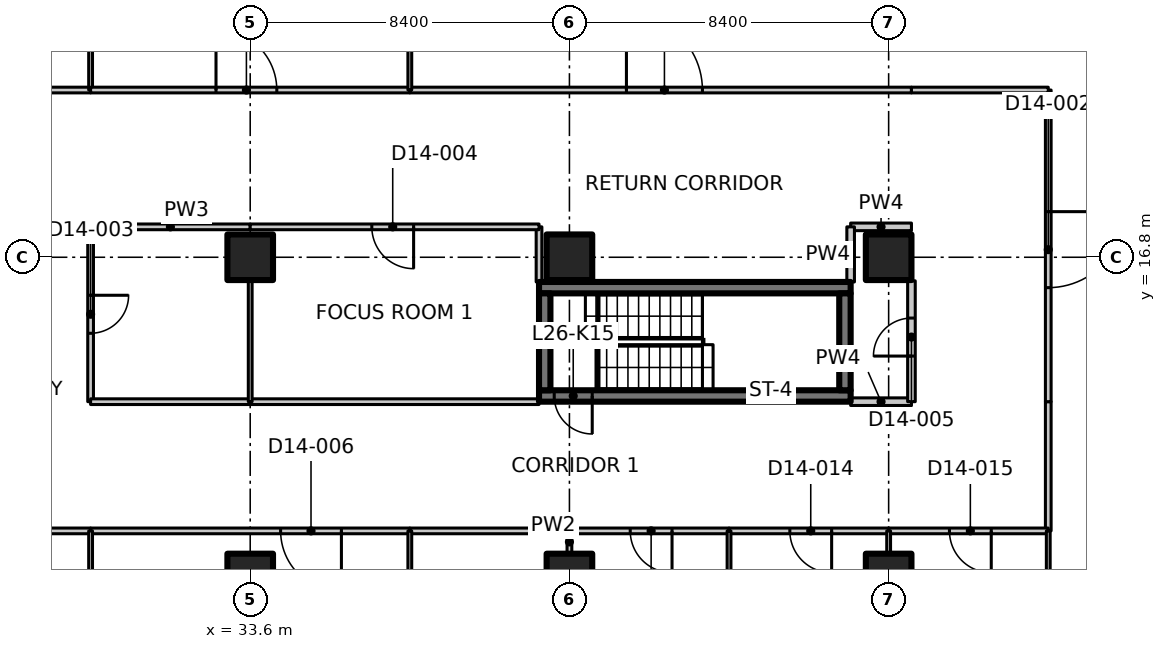
"""IFC4 building model, lengths in metres.
Left out: names, types, materials, properties, quantities, classifications, styles, units other than length and angle.
Written with IfcOpenShell. Run it as: python <this file> out.ifc"""

import sys

from ifc_helpers import new_model, si_unit, direction, frame, frame_2d, origin, origin_2d, place, context, subcontext, project, spatial, polyline, rectangle, outline, extrude, element, fill, save


model = new_model("IFC4")
c1 = context("Model", 3, precision=1e-05, world=origin(), true_north=direction((0.0, 1.0)))
c2 = subcontext(c1, "Body", "Model", "MODEL_VIEW")
j1 = project(units=[si_unit("LENGTHUNIT", "METRE"), si_unit("PLANEANGLEUNIT", "RADIAN")], contexts=[c1])
p1 = place(None, origin())
s1 = spatial("IfcSite", under=j1, at=p1, CompositionType="ELEMENT")
p2 = place(p1, origin())
s2 = spatial("IfcBuilding", under=s1, at=p2, CompositionType="ELEMENT")
p3 = place(p2, frame((0.0, 0.0, 109.7)))
s3 = spatial("IfcBuildingStorey", under=s2, at=p3, CompositionType="ELEMENT", Elevation=109.7)
for number, where, z_axis, x_axis in (
    (1, (33.6, 8.4, 0.0), (0.0, 0.0, 1.0), (1.0, 0.0, 0.0)),
    (2, (33.6, 16.8, 0.0), (0.0, 0.0, 1.0), (1.0, 0.0, 0.0)),
    (3, (42.0, 8.4, 0.0), (0.0, 0.0, 1.0), (1.0, 0.0, 0.0)),
    (4, (42.0, 16.8, 0.0), (0.0, 0.0, 1.0), (1.0, 0.0, 0.0)),
    (5, (50.4, 8.4, 0.0), (0.0, 0.0, 1.0), (1.0, 0.0, 0.0)),
    (6, (50.4, 16.8, 0.0), (0.0, 0.0, 1.0), (1.0, 0.0, 0.0)),
):
    element("IfcColumn", number, at=place(p3, frame(where, z_axis=z_axis, x_axis=x_axis)), inside=s3, PredefinedType="COLUMN", context=c2, shape_type="SweptSolid", body=[
        extrude(rectangle(XDim=1.2, YDim=1.2, at=origin_2d()), origin(), (0.0, 0.0, 1.0), 3.35),
    ])
p4 = place(p3, frame((49.4, 13.15, 0.0), z_axis=(0.0, 0.0, 1.0), x_axis=(-1.0, 0.0, 0.0)))
e7 = element("IfcWall", 7, at=p4, inside=s3, PredefinedType="SHEAR", context=c2, shape_type="SweptSolid", body=[
    extrude(rectangle(XDim=8.2, YDim=0.3, at=frame_2d((4.1, 0.0))), origin(), (0.0, 0.0, 1.0), 3.35),
])
p5 = place(p4, frame((6.8, 0.0, 0.0)))
e8 = element("IfcOpeningElement", 8, at=p5, cuts=e7, PredefinedType="OPENING", context=c2, shape_type="SweptSolid", body=[
    extrude(rectangle(XDim=1.0, YDim=2.1, at=frame_2d((0.5, 1.05))), frame((0.0, 0.16, 0.0), z_axis=(0.0, -1.0, 0.0), x_axis=(1.0, 0.0, 0.0)), (0.0, 0.0, 1.0), 0.32),
])
p6 = place(p3, frame((41.2, 16.0, 0.0), z_axis=(0.0, 0.0, 1.0), x_axis=(1.0, 0.0, 0.0)))
e9 = element("IfcWall", 9, at=p6, inside=s3, PredefinedType="SHEAR", context=c2, shape_type="SweptSolid", body=[
    extrude(rectangle(XDim=8.2, YDim=0.3, at=frame_2d((4.1, 0.0))), origin(), (0.0, 0.0, 1.0), 3.35),
])
for number, where, z_axis, x_axis in (
    (10, (41.35, 13.3, 0.0), (0.0, 0.0, 1.0), (0.0, 1.0, 0.0)),
    (11, (49.25, 13.3, 0.0), (0.0, 0.0, 1.0), (0.0, 1.0, 0.0)),
):
    element("IfcWall", number, at=place(p3, frame(where, z_axis=z_axis, x_axis=x_axis)), inside=s3, PredefinedType="SHEAR", context=c2, shape_type="SweptSolid", body=[
        extrude(rectangle(XDim=2.55, YDim=0.3, at=frame_2d((1.275, 0.0))), origin(), (0.0, 0.0, 1.0), 3.35),
    ])
p7 = place(p3, frame((25.2, 21.2, 0.0), z_axis=(0.0, 0.0, 1.0), x_axis=(1.0, 0.0, 0.0)))
e12 = element("IfcWall", 12, at=p7, inside=s3, PredefinedType="PARTITIONING", context=c2, shape_type="SweptSolid", body=[
    extrude(rectangle(XDim=4.2, YDim=0.15, at=frame_2d((2.1, 0.0))), origin(), (0.0, 0.0, 1.0), 3.33),
])
p8 = place(p3, frame((29.4, 17.6, 0.0), z_axis=(0.0, 0.0, 1.0), x_axis=(0.0, -1.0, 0.0)))
e13 = element("IfcWall", 13, at=p8, inside=s3, PredefinedType="PARTITIONING", context=c2, shape_type="SweptSolid", body=[
    extrude(rectangle(XDim=4.6, YDim=0.15, at=frame_2d((2.3, 0.0))), origin(), (0.0, 0.0, 1.0), 3.33),
])
p9 = place(p8, frame((1.8, 0.0, 0.0)))
e14 = element("IfcOpeningElement", 14, at=p9, cuts=e13, PredefinedType="OPENING", context=c2, shape_type="SweptSolid", body=[
    extrude(rectangle(XDim=1.0, YDim=2.1, at=frame_2d((0.5, 1.05))), frame((0.0, 0.085, 0.0), z_axis=(0.0, -1.0, 0.0), x_axis=(1.0, 0.0, 0.0)), (0.0, 0.0, 1.0), 0.17),
])
p10 = place(p3, frame((29.4, 9.6, 0.0), z_axis=(0.0, 0.0, 1.0), x_axis=(-1.0, 0.0, 0.0)))
e15 = element("IfcWall", 15, at=p10, inside=s3, PredefinedType="PARTITIONING", context=c2, shape_type="SweptSolid", body=[
    extrude(rectangle(XDim=4.2, YDim=0.15, at=frame_2d((2.1, 0.0))), origin(), (0.0, 0.0, 1.0), 3.33),
])
p11 = place(p3, frame((29.4, 27.429, 0.0), z_axis=(0.0, 0.0, 1.0), x_axis=(0.0, -1.0, 0.0)))
e16 = element("IfcWall", 16, at=p11, inside=s3, PredefinedType="PARTITIONING", context=c2, shape_type="SweptSolid", body=[
    extrude(outline(polyline([(0.0, 0.0), (6.229, 0.0), (6.229, 3.33), (2.679, 3.33), (2.677, 2.98), (1.781, 2.98), (1.779, 3.33), (0.154, 3.33), (0.0, 3.33), (0.0, 0.0)])), frame((0.0, 0.05, 0.0), z_axis=(0.0, -1.0, 0.0), x_axis=(1.0, 0.0, 0.0)), (0.0, 0.0, 1.0), 0.1),
])
p12 = place(p3, frame((54.6, 13.0, 0.0), z_axis=(0.0, 0.0, 1.0), x_axis=(0.0, -1.0, 0.0)))
e17 = element("IfcWall", 17, at=p12, inside=s3, PredefinedType="PARTITIONING", context=c2, shape_type="SweptSolid", body=[
    extrude(rectangle(XDim=3.4, YDim=0.15, at=frame_2d((1.7, 0.0))), origin(), (0.0, 0.0, 1.0), 3.33),
])
p13 = place(p3, frame((29.4, 13.0, 0.0), z_axis=(0.0, 0.0, 1.0), x_axis=(1.0, 0.0, 0.0)))
e18 = element("IfcWall", 18, at=p13, inside=s3, PredefinedType="PARTITIONING", context=c2, shape_type="SweptSolid", body=[
    extrude(rectangle(XDim=4.2, YDim=0.15, at=frame_2d((2.1, 0.0))), origin(), (0.0, 0.0, 1.0), 3.33),
])
p14 = place(p3, frame((33.6, 13.0, 0.0), z_axis=(0.0, 0.0, 1.0), x_axis=(1.0, 0.0, 0.0)))
e19 = element("IfcWall", 19, at=p14, inside=s3, PredefinedType="PARTITIONING", context=c2, shape_type="SweptSolid", body=[
    extrude(rectangle(XDim=7.6, YDim=0.15, at=frame_2d((3.8, 0.0))), origin(), (0.0, 0.0, 1.0), 3.33),
])
p15 = place(p3, frame((49.4, 13.0, 0.0), z_axis=(0.0, 0.0, 1.0), x_axis=(1.0, 0.0, 0.0)))
e20 = element("IfcWall", 20, at=p15, inside=s3, PredefinedType="PARTITIONING", context=c2, shape_type="SweptSolid", body=[
    extrude(rectangle(XDim=1.6, YDim=0.2, at=frame_2d((0.8, 0.0))), origin(), (0.0, 0.0, 1.0), 3.33),
])
p16 = place(p3, frame((37.8, 9.6, 0.0), z_axis=(0.0, 0.0, 1.0), x_axis=(-1.0, 0.0, 0.0)))
e21 = element("IfcWall", 21, at=p16, inside=s3, PredefinedType="PARTITIONING", context=c2, shape_type="SweptSolid", body=[
    extrude(rectangle(XDim=8.4, YDim=0.15, at=frame_2d((4.2, 0.0))), origin(), (0.0, 0.0, 1.0), 3.33),
])
p17 = place(p16, frame((1.8, 0.0, 0.0)))
e22 = element("IfcOpeningElement", 22, at=p17, cuts=e21, PredefinedType="OPENING", context=c2, shape_type="SweptSolid", body=[
    extrude(rectangle(XDim=1.6, YDim=2.1, at=frame_2d((0.8, 1.05))), frame((0.0, 0.085, 0.0), z_axis=(0.0, -1.0, 0.0), x_axis=(1.0, 0.0, 0.0)), (0.0, 0.0, 1.0), 0.17),
])
p18 = place(p3, frame((42.0, 9.6, 0.0), z_axis=(0.0, 0.0, 1.0), x_axis=(-1.0, 0.0, 0.0)))
e23 = element("IfcWall", 23, at=p18, inside=s3, PredefinedType="PARTITIONING", context=c2, shape_type="SweptSolid", body=[
    extrude(rectangle(XDim=4.2, YDim=0.15, at=frame_2d((2.1, 0.0))), origin(), (0.0, 0.0, 1.0), 3.33),
])
p19 = place(p3, frame((46.2, 9.6, 0.0), z_axis=(0.0, 0.0, 1.0), x_axis=(-1.0, 0.0, 0.0)))
e24 = element("IfcWall", 24, at=p19, inside=s3, PredefinedType="PARTITIONING", context=c2, shape_type="SweptSolid", body=[
    extrude(rectangle(XDim=4.2, YDim=0.15, at=frame_2d((2.1, 0.0))), origin(), (0.0, 0.0, 1.0), 3.33),
])
p20 = place(p19, frame((1.5, 0.0, 0.0)))
e25 = element("IfcOpeningElement", 25, at=p20, cuts=e24, PredefinedType="OPENING", context=c2, shape_type="SweptSolid", body=[
    extrude(rectangle(XDim=1.1, YDim=2.1, at=frame_2d((0.55, 1.05))), frame((0.0, 0.085, 0.0), z_axis=(0.0, -1.0, 0.0), x_axis=(1.0, 0.0, 0.0)), (0.0, 0.0, 1.0), 0.17),
])
p21 = place(p3, frame((50.4, 9.6, 0.0), z_axis=(0.0, 0.0, 1.0), x_axis=(-1.0, 0.0, 0.0)))
e26 = element("IfcWall", 26, at=p21, inside=s3, PredefinedType="PARTITIONING", context=c2, shape_type="SweptSolid", body=[
    extrude(rectangle(XDim=4.2, YDim=0.15, at=frame_2d((2.1, 0.0))), origin(), (0.0, 0.0, 1.0), 3.33),
])
p22 = place(p21, frame((1.5, 0.0, 0.0)))
e27 = element("IfcOpeningElement", 27, at=p22, cuts=e26, PredefinedType="OPENING", context=c2, shape_type="SweptSolid", body=[
    extrude(rectangle(XDim=1.1, YDim=2.1, at=frame_2d((0.55, 1.05))), frame((0.0, 0.085, 0.0), z_axis=(0.0, -1.0, 0.0), x_axis=(1.0, 0.0, 0.0)), (0.0, 0.0, 1.0), 0.17),
])
p23 = place(p3, frame((54.6, 9.6, 0.0), z_axis=(0.0, 0.0, 1.0), x_axis=(-1.0, 0.0, 0.0)))
e28 = element("IfcWall", 28, at=p23, inside=s3, PredefinedType="PARTITIONING", context=c2, shape_type="SweptSolid", body=[
    extrude(rectangle(XDim=4.2, YDim=0.15, at=frame_2d((2.1, 0.0))), origin(), (0.0, 0.0, 1.0), 3.33),
])
p24 = place(p23, frame((1.5, 0.0, 0.0)))
e29 = element("IfcOpeningElement", 29, at=p24, cuts=e28, PredefinedType="OPENING", context=c2, shape_type="SweptSolid", body=[
    extrude(rectangle(XDim=1.1, YDim=2.1, at=frame_2d((0.55, 1.05))), frame((0.0, 0.085, 0.0), z_axis=(0.0, -1.0, 0.0), x_axis=(1.0, 0.0, 0.0)), (0.0, 0.0, 1.0), 0.17),
])
p25 = place(p3, frame((54.6, 21.2, 0.0), z_axis=(0.0, 0.0, 1.0), x_axis=(0.0, -1.0, 0.0)))
e30 = element("IfcWall", 30, at=p25, inside=s3, PredefinedType="PARTITIONING", context=c2, shape_type="SweptSolid", body=[
    extrude(rectangle(XDim=8.2, YDim=0.15, at=frame_2d((4.1, 0.0))), origin(), (0.0, 0.0, 1.0), 3.33),
])
p26 = place(p25, frame((3.2, 0.0, 0.0)))
e31 = element("IfcOpeningElement", 31, at=p26, cuts=e30, PredefinedType="OPENING", context=c2, shape_type="SweptSolid", body=[
    extrude(rectangle(XDim=2.0, YDim=2.4, at=frame_2d((1.0, 1.2))), frame((0.0, 0.085, 0.0), z_axis=(0.0, -1.0, 0.0), x_axis=(1.0, 0.0, 0.0)), (0.0, 0.0, 1.0), 0.17),
])
p27 = place(p3, frame((54.6, -1.365, 0.0), z_axis=(0.0, 0.0, 1.0), x_axis=(0.0, 1.0, 0.0)))
e32 = element("IfcWall", 32, at=p27, inside=s3, PredefinedType="PARTITIONING", context=c2, shape_type="SweptSolid", body=[
    extrude(outline(polyline([(0.0, 0.0), (10.965, 0.0), (10.965, 3.33), (1.815, 3.33), (1.813, 2.98), (0.917, 2.98), (0.915, 3.33), (0.265, 3.33), (0.0, 3.33), (0.0, 0.0)])), frame((0.0, 0.05, 0.0), z_axis=(0.0, -1.0, 0.0), x_axis=(1.0, 0.0, 0.0)), (0.0, 0.0, 1.0), 0.1),
])
p28 = place(p3, frame((33.6, 17.6, 0.0), z_axis=(0.0, 0.0, 1.0), x_axis=(-1.0, 0.0, 0.0)))
e33 = element("IfcWall", 33, at=p28, inside=s3, PredefinedType="PARTITIONING", context=c2, shape_type="SweptSolid", body=[
    extrude(rectangle(XDim=4.2, YDim=0.15, at=frame_2d((2.1, 0.0))), origin(), (0.0, 0.0, 1.0), 3.33),
])
p29 = place(p3, frame((41.2, 16.15, 0.0), z_axis=(0.0, 0.0, 1.0), x_axis=(0.0, 1.0, 0.0)))
e34 = element("IfcWall", 34, at=p29, inside=s3, PredefinedType="PARTITIONING", context=c2, shape_type="SweptSolid", body=[
    extrude(rectangle(XDim=1.45, YDim=0.15, at=frame_2d((0.725, 0.0))), origin(), (0.0, 0.0, 1.0), 3.33),
])
p30 = place(p3, frame((41.2, 17.6, 0.0), z_axis=(0.0, 0.0, 1.0), x_axis=(-1.0, 0.0, 0.0)))
e35 = element("IfcWall", 35, at=p30, inside=s3, PredefinedType="PARTITIONING", context=c2, shape_type="SweptSolid", body=[
    extrude(rectangle(XDim=7.6, YDim=0.15, at=frame_2d((3.8, 0.0))), origin(), (0.0, 0.0, 1.0), 3.33),
])
p31 = place(p30, frame((3.3, 0.0, 0.0)))
e36 = element("IfcOpeningElement", 36, at=p31, cuts=e35, PredefinedType="OPENING", context=c2, shape_type="SweptSolid", body=[
    extrude(rectangle(XDim=1.1, YDim=2.1, at=frame_2d((0.55, 1.05))), frame((0.0, 0.085, 0.0), z_axis=(0.0, -1.0, 0.0), x_axis=(1.0, 0.0, 0.0)), (0.0, 0.0, 1.0), 0.17),
])
p32 = place(p3, frame((51.0, 17.6, 0.0), z_axis=(0.0, 0.0, 1.0), x_axis=(-1.0, 0.0, 0.0)))
e37 = element("IfcWall", 37, at=p32, inside=s3, PredefinedType="PARTITIONING", context=c2, shape_type="SweptSolid", body=[
    extrude(rectangle(XDim=1.6, YDim=0.2, at=frame_2d((0.8, 0.0))), origin(), (0.0, 0.0, 1.0), 3.33),
])
p33 = place(p3, frame((49.4, 17.6, 0.0), z_axis=(0.0, 0.0, 1.0), x_axis=(0.0, -1.0, 0.0)))
e38 = element("IfcWall", 38, at=p33, inside=s3, PredefinedType="PARTITIONING", context=c2, shape_type="SweptSolid", body=[
    extrude(rectangle(XDim=1.45, YDim=0.2, at=frame_2d((0.725, 0.0))), origin(), (0.0, 0.0, 1.0), 3.33),
])
p34 = place(p3, frame((29.4, 21.2, 0.0), z_axis=(0.0, 0.0, 1.0), x_axis=(1.0, 0.0, 0.0)))
e39 = element("IfcWall", 39, at=p34, inside=s3, PredefinedType="PARTITIONING", context=c2, shape_type="SweptSolid", body=[
    extrude(rectangle(XDim=8.4, YDim=0.15, at=frame_2d((4.2, 0.0))), origin(), (0.0, 0.0, 1.0), 3.33),
])
p35 = place(p34, frame((3.3, 0.0, 0.0)))
e40 = element("IfcOpeningElement", 40, at=p35, cuts=e39, PredefinedType="OPENING", context=c2, shape_type="SweptSolid", body=[
    extrude(rectangle(XDim=1.6, YDim=2.1, at=frame_2d((0.8, 1.05))), frame((0.0, 0.085, 0.0), z_axis=(0.0, -1.0, 0.0), x_axis=(1.0, 0.0, 0.0)), (0.0, 0.0, 1.0), 0.17),
])
p36 = place(p3, frame((37.8, 21.2, 0.0), z_axis=(0.0, 0.0, 1.0), x_axis=(1.0, 0.0, 0.0)))
e41 = element("IfcWall", 41, at=p36, inside=s3, PredefinedType="PARTITIONING", context=c2, shape_type="SweptSolid", body=[
    extrude(rectangle(XDim=13.2, YDim=0.15, at=frame_2d((6.6, 0.0))), origin(), (0.0, 0.0, 1.0), 3.33),
])
p37 = place(p36, frame((5.7, 0.0, 0.0)))
e42 = element("IfcOpeningElement", 42, at=p37, cuts=e41, PredefinedType="OPENING", context=c2, shape_type="SweptSolid", body=[
    extrude(rectangle(XDim=2.0, YDim=2.4, at=frame_2d((1.0, 1.2))), frame((0.0, 0.085, 0.0), z_axis=(0.0, -1.0, 0.0), x_axis=(1.0, 0.0, 0.0)), (0.0, 0.0, 1.0), 0.17),
])
p38 = place(p3, frame((51.0, 13.0, 0.0), z_axis=(0.0, 0.0, 1.0), x_axis=(0.0, 1.0, 0.0)))
e43 = element("IfcWall", 43, at=p38, inside=s3, PredefinedType="PARTITIONING", context=c2, shape_type="SweptSolid", body=[
    extrude(rectangle(XDim=3.18, YDim=0.2, at=frame_2d((1.59, 0.0))), origin(), (0.0, 0.0, 1.0), 3.33),
])
p39 = place(p38, frame((1.2, 0.0, 0.0)))
e44 = element("IfcOpeningElement", 44, at=p39, cuts=e43, PredefinedType="OPENING", context=c2, shape_type="SweptSolid", body=[
    extrude(rectangle(XDim=1.0, YDim=2.1, at=frame_2d((0.5, 1.05))), frame((0.0, 0.11, 0.0), z_axis=(0.0, -1.0, 0.0), x_axis=(1.0, 0.0, 0.0)), (0.0, 0.0, 1.0), 0.22),
])
p40 = place(p3, frame((51.0, 21.2, 0.0), z_axis=(0.0, 0.0, 1.0), x_axis=(1.0, 0.0, 0.0)))
e45 = element("IfcWall", 45, at=p40, inside=s3, PredefinedType="PARTITIONING", context=c2, shape_type="SweptSolid", body=[
    extrude(rectangle(XDim=3.6, YDim=0.15, at=frame_2d((1.8, 0.0))), origin(), (0.0, 0.0, 1.0), 3.33),
])
p41 = place(p3, frame((33.6, 16.18, 0.0), z_axis=(0.0, 0.0, 1.0), x_axis=(0.0, -1.0, 0.0)))
e46 = element("IfcWall", 46, at=p41, inside=s3, PredefinedType="PARTITIONING", context=c2, shape_type="SweptSolid", body=[
    extrude(rectangle(XDim=3.18, YDim=0.1, at=frame_2d((1.59, 0.0))), origin(), (0.0, 0.0, 1.0), 3.33),
])
p42 = place(p3, frame((37.8, 9.6, 0.0), z_axis=(0.0, 0.0, 1.0), x_axis=(0.0, -1.0, 0.0)))
e47 = element("IfcWall", 47, at=p42, inside=s3, PredefinedType="PARTITIONING", context=c2, shape_type="SweptSolid", body=[
    extrude(rectangle(XDim=4.2, YDim=0.1, at=frame_2d((2.1, 0.0))), origin(), (0.0, 0.0, 1.0), 3.33),
])
p43 = place(p3, frame((29.4, 6.0, 0.0), z_axis=(0.0, 0.0, 1.0), x_axis=(0.0, 1.0, 0.0)))
e48 = element("IfcWall", 48, at=p43, inside=s3, PredefinedType="PARTITIONING", context=c2, shape_type="SweptSolid", body=[
    extrude(rectangle(XDim=3.6, YDim=0.1, at=frame_2d((1.8, 0.0))), origin(), (0.0, 0.0, 1.0), 3.33),
])
p44 = place(p3, frame((42.0, 9.6, 0.0), z_axis=(0.0, 0.0, 1.0), x_axis=(0.0, -1.0, 0.0)))
e49 = element("IfcWall", 49, at=p44, inside=s3, PredefinedType="PARTITIONING", context=c2, shape_type="SweptSolid", body=[
    extrude(rectangle(XDim=0.58, YDim=0.125, at=frame_2d((0.29, 0.0))), origin(), (0.0, 0.0, 1.0), 3.33),
])
p45 = place(p3, frame((46.2, 9.6, 0.0), z_axis=(0.0, 0.0, 1.0), x_axis=(0.0, -1.0, 0.0)))
e50 = element("IfcWall", 50, at=p45, inside=s3, PredefinedType="PARTITIONING", context=c2, shape_type="SweptSolid", body=[
    extrude(outline(polyline([(0.0, 0.0), (10.965, 0.0), (10.965, 3.33), (10.7, 3.33), (10.05, 3.33), (10.048, 2.98), (9.152, 2.98), (9.15, 3.33), (0.0, 3.33), (0.0, 0.0)])), frame((0.0, 0.05, 0.0), z_axis=(0.0, -1.0, 0.0), x_axis=(1.0, 0.0, 0.0)), (0.0, 0.0, 1.0), 0.1),
])
p46 = place(p3, frame((50.4, 9.6, 0.0), z_axis=(0.0, 0.0, 1.0), x_axis=(0.0, -1.0, 0.0)))
e51 = element("IfcWall", 51, at=p46, inside=s3, PredefinedType="PARTITIONING", context=c2, shape_type="SweptSolid", body=[
    extrude(rectangle(XDim=0.58, YDim=0.1, at=frame_2d((0.29, 0.0))), origin(), (0.0, 0.0, 1.0), 3.33),
])
p47 = place(p3, frame((37.8, 30.243, 0.0), z_axis=(0.0, 0.0, 1.0), x_axis=(0.0, -1.0, 0.0)))
e52 = element("IfcWall", 52, at=p47, inside=s3, PredefinedType="PARTITIONING", context=c2, shape_type="SweptSolid", body=[
    extrude(outline(polyline([(0.0, 0.0), (9.043, 0.0), (9.043, 3.33), (5.493, 3.33), (5.491, 2.98), (4.595, 2.98), (4.593, 3.33), (0.0, 3.33), (0.0, 0.0)])), frame((0.0, 0.05, 0.0), z_axis=(0.0, -1.0, 0.0), x_axis=(1.0, 0.0, 0.0)), (0.0, 0.0, 1.0), 0.1),
])
p48 = place(p5, origin())
e53 = element("IfcDoor", 53, at=p48, inside=s3, OperationType="SINGLE_SWING_LEFT", PredefinedType="DOOR", context=c2, shape_type="SweptSolid", body=[
    extrude(rectangle(XDim=1.0, YDim=2.1, at=frame_2d((0.5, 1.05))), frame((0.0, 0.025, 0.0), z_axis=(0.0, -1.0, 0.0), x_axis=(1.0, 0.0, 0.0)), (0.0, 0.0, 1.0), 0.05),
])
fill(e8, e53)
p49 = place(p26, origin())
e54 = element("IfcDoor", 54, at=p49, inside=s3, OperationType="DOUBLE_DOOR_SINGLE_SWING", PredefinedType="DOOR", context=c2, shape_type="SweptSolid", body=[
    extrude(rectangle(XDim=2.0, YDim=2.4, at=frame_2d((1.0, 1.2))), frame((0.0, 0.025, 0.0), z_axis=(0.0, -1.0, 0.0), x_axis=(1.0, 0.0, 0.0)), (0.0, 0.0, 1.0), 0.05),
])
fill(e31, e54)
p50 = place(p9, origin())
e55 = element("IfcDoor", 55, at=p50, inside=s3, OperationType="SINGLE_SWING_LEFT", PredefinedType="DOOR", context=c2, shape_type="SweptSolid", body=[
    extrude(rectangle(XDim=1.0, YDim=2.1, at=frame_2d((0.5, 1.05))), frame((0.0, 0.025, 0.0), z_axis=(0.0, -1.0, 0.0), x_axis=(1.0, 0.0, 0.0)), (0.0, 0.0, 1.0), 0.05),
])
fill(e14, e55)
p51 = place(p31, origin())
e56 = element("IfcDoor", 56, at=p51, inside=s3, OperationType="SINGLE_SWING_LEFT", PredefinedType="DOOR", context=c2, shape_type="SweptSolid", body=[
    extrude(rectangle(XDim=1.1, YDim=2.1, at=frame_2d((0.55, 1.05))), frame((0.0, 0.025, 0.0), z_axis=(0.0, -1.0, 0.0), x_axis=(1.0, 0.0, 0.0)), (0.0, 0.0, 1.0), 0.05),
])
fill(e36, e56)
p52 = place(p39, origin())
e57 = element("IfcDoor", 57, at=p52, inside=s3, OperationType="SINGLE_SWING_LEFT", PredefinedType="DOOR", context=c2, shape_type="SweptSolid", body=[
    extrude(rectangle(XDim=1.0, YDim=2.1, at=frame_2d((0.5, 1.05))), frame((0.0, 0.025, 0.0), z_axis=(0.0, -1.0, 0.0), x_axis=(1.0, 0.0, 0.0)), (0.0, 0.0, 1.0), 0.05),
])
fill(e44, e57)
p53 = place(p17, origin())
e58 = element("IfcDoor", 58, at=p53, inside=s3, OperationType="DOUBLE_DOOR_SINGLE_SWING", PredefinedType="DOOR", context=c2, shape_type="SweptSolid", body=[
    extrude(rectangle(XDim=1.6, YDim=2.1, at=frame_2d((0.8, 1.05))), frame((0.0, 0.025, 0.0), z_axis=(0.0, -1.0, 0.0), x_axis=(1.0, 0.0, 0.0)), (0.0, 0.0, 1.0), 0.05),
])
fill(e22, e58)
p54 = place(p20, origin())
e59 = element("IfcDoor", 59, at=p54, inside=s3, OperationType="SINGLE_SWING_LEFT", PredefinedType="DOOR", context=c2, shape_type="SweptSolid", body=[
    extrude(rectangle(XDim=1.1, YDim=2.1, at=frame_2d((0.55, 1.05))), frame((0.0, 0.025, 0.0), z_axis=(0.0, -1.0, 0.0), x_axis=(1.0, 0.0, 0.0)), (0.0, 0.0, 1.0), 0.05),
])
fill(e25, e59)
p55 = place(p22, origin())
e60 = element("IfcDoor", 60, at=p55, inside=s3, OperationType="SINGLE_SWING_LEFT", PredefinedType="DOOR", context=c2, shape_type="SweptSolid", body=[
    extrude(rectangle(XDim=1.1, YDim=2.1, at=frame_2d((0.55, 1.05))), frame((0.0, 0.025, 0.0), z_axis=(0.0, -1.0, 0.0), x_axis=(1.0, 0.0, 0.0)), (0.0, 0.0, 1.0), 0.05),
])
fill(e27, e60)
p56 = place(p24, origin())
e61 = element("IfcDoor", 61, at=p56, inside=s3, OperationType="SINGLE_SWING_LEFT", PredefinedType="DOOR", context=c2, shape_type="SweptSolid", body=[
    extrude(rectangle(XDim=1.1, YDim=2.1, at=frame_2d((0.55, 1.05))), frame((0.0, 0.025, 0.0), z_axis=(0.0, -1.0, 0.0), x_axis=(1.0, 0.0, 0.0)), (0.0, 0.0, 1.0), 0.05),
])
fill(e29, e61)
p57 = place(p35, origin())
e62 = element("IfcDoor", 62, at=p57, inside=s3, OperationType="DOUBLE_DOOR_SINGLE_SWING", PredefinedType="DOOR", context=c2, shape_type="SweptSolid", body=[
    extrude(rectangle(XDim=1.6, YDim=2.1, at=frame_2d((0.8, 1.05))), frame((0.0, 0.025, 0.0), z_axis=(0.0, -1.0, 0.0), x_axis=(1.0, 0.0, 0.0)), (0.0, 0.0, 1.0), 0.05),
])
fill(e40, e62)
p58 = place(p37, origin())
e63 = element("IfcDoor", 63, at=p58, inside=s3, OperationType="DOUBLE_DOOR_SINGLE_SWING", PredefinedType="DOOR", context=c2, shape_type="SweptSolid", body=[
    extrude(rectangle(XDim=2.0, YDim=2.4, at=frame_2d((1.0, 1.2))), frame((0.0, 0.025, 0.0), z_axis=(0.0, -1.0, 0.0), x_axis=(1.0, 0.0, 0.0)), (0.0, 0.0, 1.0), 0.05),
])
fill(e42, e63)
save(model, sys.argv[1])
